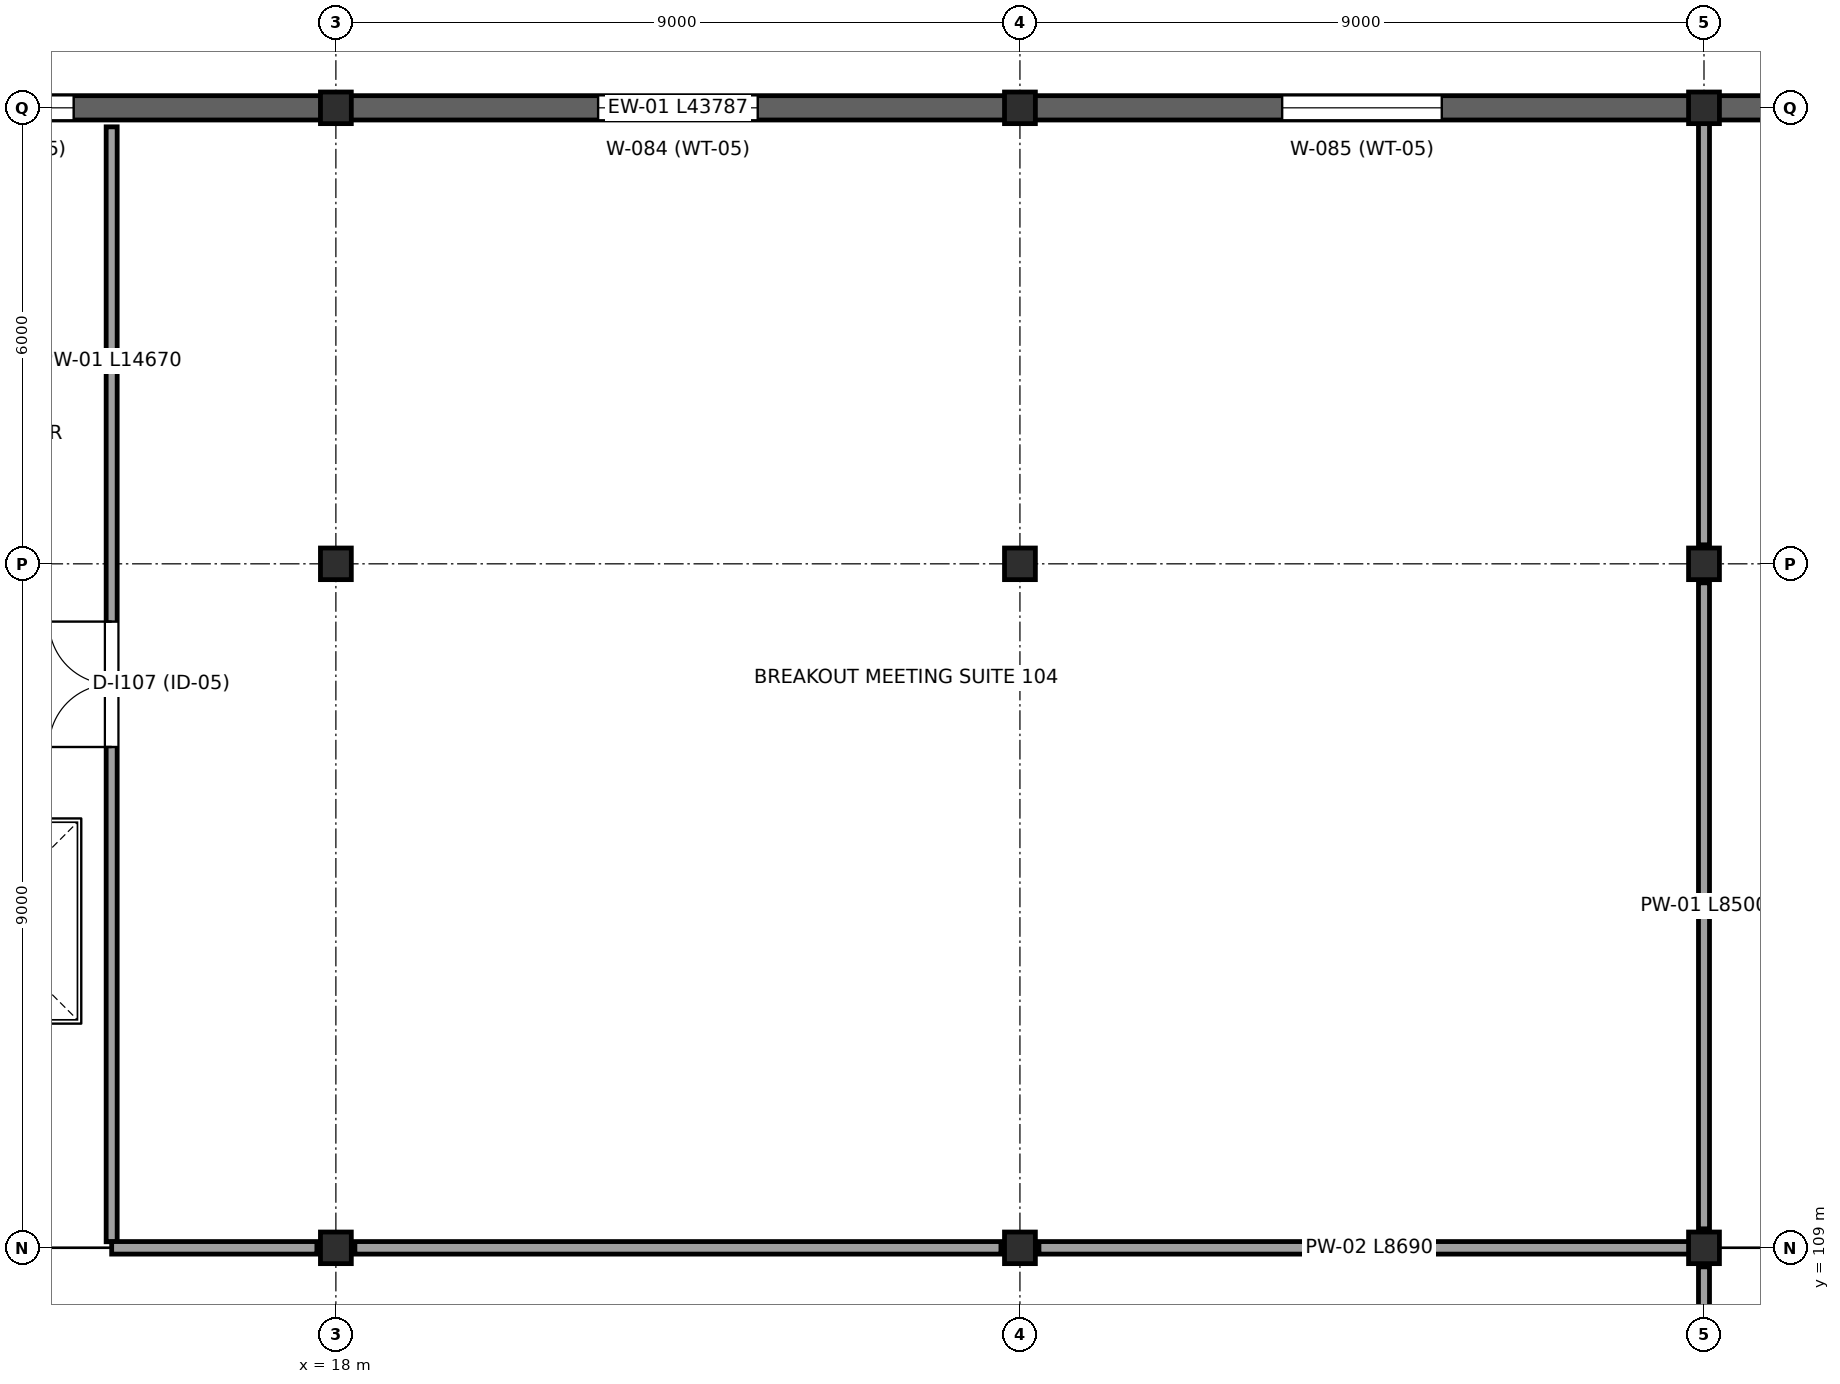
"""IFC4 building model, lengths in metres.
Left out: names, types, materials, properties, quantities, classifications, styles, units other than length and angle.
Written with IfcOpenShell. Run it as: python <this file> out.ifc"""

import sys

from ifc_helpers import new_model, si_unit, direction, frame, frame_2d, origin, origin_2d, place, context, subcontext, project, spatial, rectangle, i_section, extrude, element, fill, save


model = new_model("IFC4")
c1 = context("Model", 3, precision=1e-05, world=origin(), true_north=direction((0.0, 1.0)))
c2 = subcontext(c1, "Body", "Model", "MODEL_VIEW")
j1 = project(units=[si_unit("LENGTHUNIT", "METRE"), si_unit("PLANEANGLEUNIT", "RADIAN")], contexts=[c1])
p1 = place(None, origin())
s1 = spatial("IfcSite", under=j1, at=p1, CompositionType="ELEMENT")
p2 = place(p1, origin())
s2 = spatial("IfcBuilding", under=s1, at=p2, CompositionType="ELEMENT")
p3 = place(p2, frame((0.0, 0.0, 6.0)))
s3 = spatial("IfcBuildingStorey", under=s2, at=p3, CompositionType="ELEMENT", Elevation=6.0)
for number, where, z_axis, x_axis in (
    (1, (18.0, 109.0, 0.0), (0.0, 0.0, 1.0), (1.0, 0.0, 0.0)),
    (2, (18.0, 118.0, 0.0), (0.0, 0.0, 1.0), (1.0, 0.0, 0.0)),
    (3, (18.0, 124.0, 0.0), (0.0, 0.0, 1.0), (1.0, 0.0, 0.0)),
    (4, (27.0, 109.0, 0.0), (0.0, 0.0, 1.0), (1.0, 0.0, 0.0)),
    (5, (27.0, 118.0, 0.0), (0.0, 0.0, 1.0), (1.0, 0.0, 0.0)),
    (6, (27.0, 124.0, 0.0), (0.0, 0.0, 1.0), (1.0, 0.0, 0.0)),
    (7, (36.0, 109.0, 0.0), (0.0, 0.0, 1.0), (1.0, 0.0, 0.0)),
    (8, (36.0, 118.0, 0.0), (0.0, 0.0, 1.0), (1.0, 0.0, 0.0)),
    (9, (36.0, 124.0, 0.0), (0.0, 0.0, 1.0), (1.0, 0.0, 0.0)),
):
    element("IfcColumn", number, at=place(p3, frame(where, z_axis=z_axis, x_axis=x_axis)), inside=s3, PredefinedType="COLUMN", context=c2, shape_type="SweptSolid", body=[
        extrude(i_section(OverallWidth=0.406, OverallDepth=0.416, WebThickness=0.03, FlangeThickness=0.048, at=origin_2d()), origin(), (0.0, 0.0, 1.0), 6.0),
    ])
p4 = place(p3, frame((9.022, 124.0, 0.0), z_axis=(0.0, 0.0, 1.0), x_axis=(1.0, 0.0, 0.0)))
e10 = element("IfcWall", 10, at=p4, inside=s3, PredefinedType="STANDARD", context=c2, shape_type="SweptSolid", body=[
    extrude(rectangle(XDim=8.956, YDim=0.32, at=frame_2d((4.478, 0.0))), origin(), (0.0, 0.0, 1.0), 5.78),
])
p5 = place(p4, frame((3.428, 0.0, 1.0)))
e11 = element("IfcOpeningElement", 11, at=p5, cuts=e10, PredefinedType="OPENING", context=c2, shape_type="SweptSolid", body=[
    extrude(rectangle(XDim=2.1, YDim=2.25, at=frame_2d((1.05, 1.125))), frame((0.0, 0.17, 0.0), z_axis=(0.0, -1.0, 0.0), x_axis=(1.0, 0.0, 0.0)), (0.0, 0.0, 1.0), 0.34),
])
p6 = place(p3, frame((18.022, 124.0, 0.0), z_axis=(0.0, 0.0, 1.0), x_axis=(1.0, 0.0, 0.0)))
e12 = element("IfcWall", 12, at=p6, inside=s3, PredefinedType="STANDARD", context=c2, shape_type="SweptSolid", body=[
    extrude(rectangle(XDim=8.956, YDim=0.32, at=frame_2d((4.478, 0.0))), origin(), (0.0, 0.0, 1.0), 5.78),
])
p7 = place(p6, frame((3.428, 0.0, 1.0)))
e13 = element("IfcOpeningElement", 13, at=p7, cuts=e12, PredefinedType="OPENING", context=c2, shape_type="SweptSolid", body=[
    extrude(rectangle(XDim=2.1, YDim=2.25, at=frame_2d((1.05, 1.125))), frame((0.0, 0.17, 0.0), z_axis=(0.0, -1.0, 0.0), x_axis=(1.0, 0.0, 0.0)), (0.0, 0.0, 1.0), 0.34),
])
p8 = place(p3, frame((27.022, 124.0, 0.0), z_axis=(0.0, 0.0, 1.0), x_axis=(1.0, 0.0, 0.0)))
e14 = element("IfcWall", 14, at=p8, inside=s3, PredefinedType="STANDARD", context=c2, shape_type="SweptSolid", body=[
    extrude(rectangle(XDim=8.956, YDim=0.32, at=frame_2d((4.478, 0.0))), origin(), (0.0, 0.0, 1.0), 5.78),
])
p9 = place(p8, frame((3.428, 0.0, 1.0)))
e15 = element("IfcOpeningElement", 15, at=p9, cuts=e14, PredefinedType="OPENING", context=c2, shape_type="SweptSolid", body=[
    extrude(rectangle(XDim=2.1, YDim=2.25, at=frame_2d((1.05, 1.125))), frame((0.0, 0.17, 0.0), z_axis=(0.0, -1.0, 0.0), x_axis=(1.0, 0.0, 0.0)), (0.0, 0.0, 1.0), 0.34),
])
p10 = place(p3, frame((36.022, 124.0, 0.0), z_axis=(0.0, 0.0, 1.0), x_axis=(1.0, 0.0, 0.0)))
e16 = element("IfcWall", 16, at=p10, inside=s3, PredefinedType="STANDARD", context=c2, shape_type="SweptSolid", body=[
    extrude(rectangle(XDim=7.963, YDim=0.32, at=frame_2d((3.981, 0.0))), origin(), (0.0, 0.0, 1.0), 5.78),
])
p11 = place(p10, frame((2.931, 0.0, 1.0)))
e17 = element("IfcOpeningElement", 17, at=p11, cuts=e16, PredefinedType="OPENING", context=c2, shape_type="SweptSolid", body=[
    extrude(rectangle(XDim=2.1, YDim=2.25, at=frame_2d((1.05, 1.125))), frame((0.0, 0.17, 0.0), z_axis=(0.0, -1.0, 0.0), x_axis=(1.0, 0.0, 0.0)), (0.0, 0.0, 1.0), 0.34),
])
p12 = place(p3, frame((15.05, 109.08, 0.0), z_axis=(0.0, 0.0, 1.0), x_axis=(0.0, 1.0, 0.0)))
e18 = element("IfcWall", 18, at=p12, inside=s3, PredefinedType="PARTITIONING", context=c2, shape_type="SweptSolid", body=[
    extrude(rectangle(XDim=14.67, YDim=0.145, at=frame_2d((7.335, 0.0))), origin(), (0.0, 0.0, 1.0), 4.55),
])
p13 = place(p12, frame((6.51, 0.0, 0.0)))
e19 = element("IfcOpeningElement", 19, at=p13, cuts=e18, PredefinedType="OPENING", context=c2, shape_type="SweptSolid", body=[
    extrude(rectangle(XDim=1.65, YDim=2.25, at=frame_2d((0.825, 1.125))), frame((0.0, 0.083, 0.0), z_axis=(0.0, -1.0, 0.0), x_axis=(1.0, 0.0, 0.0)), (0.0, 0.0, 1.0), 0.165),
])
p14 = place(p3, frame((15.05, 109.0, 0.0), z_axis=(0.0, 0.0, 1.0), x_axis=(1.0, 0.0, 0.0)))
e20 = element("IfcWall", 20, at=p14, inside=s3, PredefinedType="PARTITIONING", context=c2, shape_type="SweptSolid", body=[
    extrude(rectangle(XDim=2.7, YDim=0.165, at=frame_2d((1.35, 0.0))), origin(), (0.0, 0.0, 1.0), 4.55),
])
p15 = place(p3, frame((18.25, 109.0, 0.0), z_axis=(0.0, 0.0, 1.0), x_axis=(1.0, 0.0, 0.0)))
e21 = element("IfcWall", 21, at=p15, inside=s3, PredefinedType="PARTITIONING", context=c2, shape_type="SweptSolid", body=[
    extrude(rectangle(XDim=8.5, YDim=0.165, at=frame_2d((4.25, 0.0))), origin(), (0.0, 0.0, 1.0), 4.55),
])
p16 = place(p3, frame((27.25, 109.0, 0.0), z_axis=(0.0, 0.0, 1.0), x_axis=(1.0, 0.0, 0.0)))
e22 = element("IfcWall", 22, at=p16, inside=s3, PredefinedType="PARTITIONING", context=c2, shape_type="SweptSolid", body=[
    extrude(rectangle(XDim=8.69, YDim=0.165, at=frame_2d((4.345, 0.0))), origin(), (0.0, 0.0, 1.0), 4.55),
])
p17 = place(p3, frame((36.0, 100.25, 0.0), z_axis=(0.0, 0.0, 1.0), x_axis=(0.0, 1.0, 0.0)))
e23 = element("IfcWall", 23, at=p17, inside=s3, PredefinedType="PARTITIONING", context=c2, shape_type="SweptSolid", body=[
    extrude(rectangle(XDim=8.5, YDim=0.145, at=frame_2d((4.25, 0.0))), origin(), (0.0, 0.0, 1.0), 4.55),
])
p18 = place(p17, frame((6.15, 0.0, 0.0)))
e24 = element("IfcOpeningElement", 24, at=p18, cuts=e23, PredefinedType="OPENING", context=c2, shape_type="SweptSolid", body=[
    extrude(rectangle(XDim=1.08, YDim=2.26, at=frame_2d((0.54, 1.13))), frame((0.0, 0.083, 0.0), z_axis=(0.0, -1.0, 0.0), x_axis=(1.0, 0.0, 0.0)), (0.0, 0.0, 1.0), 0.165),
])
p19 = place(p3, frame((36.0, 109.25, 0.0), z_axis=(0.0, 0.0, 1.0), x_axis=(0.0, 1.0, 0.0)))
e25 = element("IfcWall", 25, at=p19, inside=s3, PredefinedType="PARTITIONING", context=c2, shape_type="SweptSolid", body=[
    extrude(rectangle(XDim=8.5, YDim=0.145, at=frame_2d((4.25, 0.0))), origin(), (0.0, 0.0, 1.0), 4.55),
])
p20 = place(p3, frame((36.0, 118.25, 0.0), z_axis=(0.0, 0.0, 1.0), x_axis=(0.0, 1.0, 0.0)))
e26 = element("IfcWall", 26, at=p20, inside=s3, PredefinedType="PARTITIONING", context=c2, shape_type="SweptSolid", body=[
    extrude(rectangle(XDim=5.55, YDim=0.145, at=frame_2d((2.775, 0.0))), origin(), (0.0, 0.0, 1.0), 4.55),
])
p21 = place(p5, origin())
e27 = element("IfcWindow", 27, at=p21, inside=s3, PartitioningType="SINGLE_PANEL", PredefinedType="WINDOW", context=c2, shape_type="SweptSolid", body=[
    extrude(rectangle(XDim=2.1, YDim=2.25, at=frame_2d((1.05, 1.125))), frame((0.0, 0.03, 0.0), z_axis=(0.0, -1.0, 0.0), x_axis=(1.0, 0.0, 0.0)), (0.0, 0.0, 1.0), 0.06),
])
fill(e11, e27)
p22 = place(p7, origin())
e28 = element("IfcWindow", 28, at=p22, inside=s3, PartitioningType="SINGLE_PANEL", PredefinedType="WINDOW", context=c2, shape_type="SweptSolid", body=[
    extrude(rectangle(XDim=2.1, YDim=2.25, at=frame_2d((1.05, 1.125))), frame((0.0, 0.03, 0.0), z_axis=(0.0, -1.0, 0.0), x_axis=(1.0, 0.0, 0.0)), (0.0, 0.0, 1.0), 0.06),
])
fill(e13, e28)
p23 = place(p9, origin())
e29 = element("IfcWindow", 29, at=p23, inside=s3, PartitioningType="SINGLE_PANEL", PredefinedType="WINDOW", context=c2, shape_type="SweptSolid", body=[
    extrude(rectangle(XDim=2.1, YDim=2.25, at=frame_2d((1.05, 1.125))), frame((0.0, 0.03, 0.0), z_axis=(0.0, -1.0, 0.0), x_axis=(1.0, 0.0, 0.0)), (0.0, 0.0, 1.0), 0.06),
])
fill(e15, e29)
p24 = place(p13, origin())
e30 = element("IfcDoor", 30, at=p24, inside=s3, OperationType="DOUBLE_DOOR_SINGLE_SWING", PredefinedType="DOOR", context=c2, shape_type="SweptSolid", body=[
    extrude(rectangle(XDim=1.65, YDim=2.25, at=frame_2d((0.825, 1.125))), frame((0.0, 0.025, 0.0), z_axis=(0.0, -1.0, 0.0), x_axis=(1.0, 0.0, 0.0)), (0.0, 0.0, 1.0), 0.05),
])
fill(e19, e30)
save(model, sys.argv[1])
